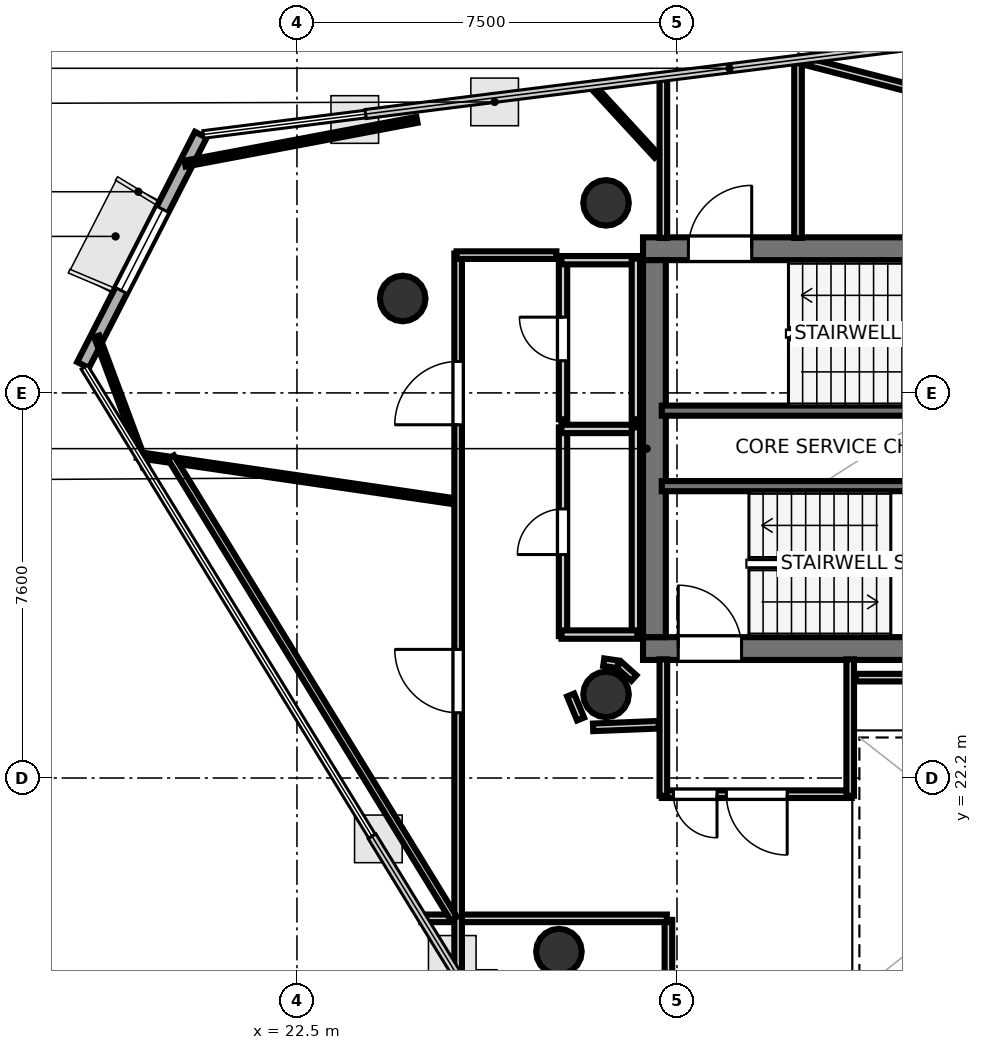
"""IFC4 building model, lengths in metres.
Left out: names, types, materials, properties, quantities, classifications, styles, units other than length and angle.
Written with IfcOpenShell. Run it as: python <this file> out.ifc"""

import sys

from ifc_helpers import new_model, si_unit, direction, frame, frame_2d, origin, origin_2d, place, context, subcontext, project, spatial, rectangle, hollow_circle, extrude, element, fill, save


model = new_model("IFC4")
c1 = context("Model", 3, precision=1e-05, world=origin(), true_north=direction((0.0, 1.0)))
c2 = subcontext(c1, "Body", "Model", "MODEL_VIEW")
j1 = project(units=[si_unit("LENGTHUNIT", "METRE"), si_unit("PLANEANGLEUNIT", "RADIAN")], contexts=[c1])
p1 = place(None, origin())
s1 = spatial("IfcSite", under=j1, at=p1, CompositionType="ELEMENT")
p2 = place(p1, origin())
s2 = spatial("IfcBuilding", under=s1, at=p2, CompositionType="ELEMENT")
p3 = place(p2, frame((0.0, 0.0, 284.3)))
s3 = spatial("IfcBuildingStorey", under=s2, at=p3, CompositionType="ELEMENT", Elevation=284.3)
p4 = place(p3, frame((29.33, 32.645, 0.0), z_axis=(0.0, 0.0, 1.0), x_axis=(1.0, 0.0, 0.0)))
e1 = element("IfcWall", 1, at=p4, inside=s3, PredefinedType="SHEAR", context=c2, shape_type="SweptSolid", body=[
    extrude(rectangle(XDim=10.52, YDim=0.45, at=frame_2d((5.26, 0.0))), origin(), (0.0, 0.0, 1.0), 3.52),
])
p5 = place(p4, frame((0.895, 0.0, 0.0)))
e2 = element("IfcOpeningElement", 2, at=p5, cuts=e1, PredefinedType="OPENING", context=c2, shape_type="SweptSolid", body=[
    extrude(rectangle(XDim=1.25, YDim=2.15, at=frame_2d((0.625, 1.075))), frame((0.0, 0.235, 0.0), z_axis=(0.0, -1.0, 0.0), x_axis=(1.0, 0.0, 0.0)), (0.0, 0.0, 1.0), 0.47),
])
p6 = place(p3, frame((29.33, 24.755, 0.0), z_axis=(0.0, 0.0, 1.0), x_axis=(1.0, 0.0, 0.0)))
e3 = element("IfcWall", 3, at=p6, inside=s3, PredefinedType="SHEAR", context=c2, shape_type="SweptSolid", body=[
    extrude(rectangle(XDim=10.52, YDim=0.45, at=frame_2d((5.26, 0.0))), origin(), (0.0, 0.0, 1.0), 3.52),
])
p7 = place(p6, frame((0.695, 0.0, 0.0)))
e4 = element("IfcOpeningElement", 4, at=p7, cuts=e3, PredefinedType="OPENING", context=c2, shape_type="SweptSolid", body=[
    extrude(rectangle(XDim=1.25, YDim=2.15, at=frame_2d((0.625, 1.075))), frame((0.0, 0.235, 0.0), z_axis=(0.0, -1.0, 0.0), x_axis=(1.0, 0.0, 0.0)), (0.0, 0.0, 1.0), 0.47),
])
p8 = place(p3, frame((29.555, 24.98, 0.0), z_axis=(0.0, 0.0, 1.0), x_axis=(0.0, 1.0, 0.0)))
e5 = element("IfcWall", 5, at=p8, inside=s3, PredefinedType="SHEAR", context=c2, shape_type="SweptSolid", body=[
    extrude(rectangle(XDim=7.44, YDim=0.45, at=frame_2d((3.72, 0.0))), origin(), (0.0, 0.0, 1.0), 3.52),
])
for number, where, z_axis, x_axis in (
    (6, (28.6, 33.55, 0.0), (0.0, 0.0, 1.0), (1.0, 0.0, 0.0)),
    (7, (28.6, 23.85, 0.0), (0.0, 0.0, 1.0), (1.0, 0.0, 0.0)),
    (8, (24.587, 31.663, 0.0), (0.0, 0.0, 1.0), (1.0, 0.0, 0.0)),
    (9, (27.67, 18.774, 0.0), (0.0, 0.0, 1.0), (1.0, 0.0, 0.0)),
):
    element("IfcColumn", number, at=place(p3, frame(where, z_axis=z_axis, x_axis=x_axis)), inside=s3, PredefinedType="COLUMN", context=c2, shape_type="SweptSolid", body=[
        extrude(hollow_circle(Radius=0.45, WallThickness=0.025, at=origin_2d()), origin(), (0.0, 0.0, 1.0), 3.7),
    ])
p9 = place(p3, frame((20.603, 34.894, 0.0), z_axis=(0.0, 0.0, 1.0), x_axis=(-0.455422024199, -0.890275676335, 0.0)))
e10 = element("IfcWall", 10, at=p9, inside=s3, PredefinedType="SOLIDWALL", context=c2, shape_type="SweptSolid", body=[
    extrude(rectangle(XDim=5.104, YDim=0.26, at=frame_2d((2.552, 0.0))), origin(), (0.0, 0.0, 1.0), 3.52),
])
p10 = place(p9, frame((1.652, 0.0, 0.85)))
e11 = element("IfcOpeningElement", 11, at=p10, cuts=e10, PredefinedType="OPENING", context=c2, shape_type="SweptSolid", body=[
    extrude(rectangle(XDim=1.8, YDim=2.1, at=frame_2d((0.9, 1.05))), frame((0.0, 0.14, 0.0), z_axis=(0.0, -1.0, 0.0), x_axis=(1.0, 0.0, 0.0)), (0.0, 0.0, 1.0), 0.28),
])
p11 = place(p3, frame((29.7, 29.45, 0.0), z_axis=(0.0, 0.0, 1.0), x_axis=(1.0, 0.0, 0.0)))
e12 = element("IfcWall", 12, at=p11, inside=s3, PredefinedType="SOLIDWALL", context=c2, shape_type="SweptSolid", body=[
    extrude(rectangle(XDim=8.3, YDim=0.2, at=frame_2d((4.15, 0.0))), origin(), (0.0, 0.0, 1.0), 3.52),
])
p12 = place(p3, frame((29.7, 27.96, 0.0), z_axis=(0.0, 0.0, 1.0), x_axis=(1.0, 0.0, 0.0)))
e13 = element("IfcWall", 13, at=p12, inside=s3, PredefinedType="SOLIDWALL", context=c2, shape_type="SweptSolid", body=[
    extrude(rectangle(XDim=7.75, YDim=0.2, at=frame_2d((3.875, 0.0))), origin(), (0.0, 0.0, 1.0), 3.52),
])
p13 = place(p3, frame((29.731, 32.858, 0.0), z_axis=(0.0, 0.0, 1.0), x_axis=(0.0, 1.0, 0.0)))
e14 = element("IfcWall", 14, at=p13, inside=s3, PredefinedType="PARTITIONING", context=c2, shape_type="SweptSolid", body=[
    extrude(rectangle(XDim=3.204, YDim=0.15, at=frame_2d((1.602, 0.0))), origin(), (0.0, 0.0, 1.0), 2.84),
])
p14 = place(p3, frame((32.389, 36.396, 0.0), z_axis=(0.0, 0.0, 1.0), x_axis=(0.0, -1.0, 0.0)))
e15 = element("IfcWall", 15, at=p14, inside=s3, PredefinedType="PARTITIONING", context=c2, shape_type="SweptSolid", body=[
    extrude(rectangle(XDim=3.538, YDim=0.15, at=frame_2d((1.769, 0.0))), origin(), (0.0, 0.0, 1.0), 2.84),
])
p15 = place(p3, frame((33.45, 21.881, 0.0), z_axis=(0.0, 0.0, 1.0), x_axis=(-1.0, 0.0, 0.0)))
e16 = element("IfcWall", 16, at=p15, inside=s3, PredefinedType="PARTITIONING", context=c2, shape_type="SweptSolid", body=[
    extrude(rectangle(XDim=3.75, YDim=0.15, at=frame_2d((1.875, 0.0))), origin(), (0.0, 0.0, 1.0), 2.84),
])
p16 = place(p15, frame((1.275, 0.0, 0.0)))
e17 = element("IfcOpeningElement", 17, at=p16, cuts=e16, PredefinedType="OPENING", context=c2, shape_type="SweptSolid", body=[
    extrude(rectangle(XDim=1.2, YDim=2.15, at=frame_2d((0.6, 1.075))), frame((0.0, 0.085, 0.0), z_axis=(0.0, -1.0, 0.0), x_axis=(1.0, 0.0, 0.0)), (0.0, 0.0, 1.0), 0.17),
])
p17 = place(p15, frame((2.66, 0.0, 0.0)))
e18 = element("IfcOpeningElement", 18, at=p17, cuts=e16, PredefinedType="OPENING", context=c2, shape_type="SweptSolid", body=[
    extrude(rectangle(XDim=0.86, YDim=2.05, at=frame_2d((0.43, 1.025))), frame((0.0, 0.085, 0.0), z_axis=(0.0, -1.0, 0.0), x_axis=(1.0, 0.0, 0.0)), (0.0, 0.0, 1.0), 0.17),
])
for number, where, z_axis, x_axis in (
    (19, (29.731, 21.85, 0.0), (0.0, 0.0, 1.0), (0.0, 1.0, 0.0)),
    (20, (33.419, 24.542, 0.0), (0.0, 0.0, 1.0), (0.0, -1.0, 0.0)),
):
    element("IfcWall", number, at=place(p3, frame(where, z_axis=z_axis, x_axis=x_axis)), inside=s3, PredefinedType="PARTITIONING", context=c2, shape_type="SweptSolid", body=[
        extrude(rectangle(XDim=2.692, YDim=0.15, at=frame_2d((1.346, 0.0))), origin(), (0.0, 0.0, 1.0), 2.84),
    ])
p18 = place(p3, frame((27.751, 25.0, 0.0), z_axis=(0.0, 0.0, 1.0), x_axis=(0.0, 1.0, 0.0)))
e21 = element("IfcWall", 21, at=p18, inside=s3, PredefinedType="PLUMBINGWALL", context=c2, shape_type="SweptSolid", body=[
    extrude(rectangle(XDim=4.12, YDim=0.165, at=frame_2d((2.06, 0.0))), origin(), (0.0, 0.0, 1.0), 2.84),
])
p19 = place(p18, frame((1.61, 0.0, 0.0)))
e22 = element("IfcOpeningElement", 22, at=p19, cuts=e21, PredefinedType="OPENING", context=c2, shape_type="SweptSolid", body=[
    extrude(rectangle(XDim=0.9, YDim=2.1, at=frame_2d((0.45, 1.05))), frame((0.0, 0.093, 0.0), z_axis=(0.0, -1.0, 0.0), x_axis=(1.0, 0.0, 0.0)), (0.0, 0.0, 1.0), 0.185),
])
p20 = place(p3, frame((27.72, 29.089, 0.0), z_axis=(0.0, 0.0, 1.0), x_axis=(1.0, 0.0, 0.0)))
e23 = element("IfcWall", 23, at=p20, inside=s3, PredefinedType="PLUMBINGWALL", context=c2, shape_type="SweptSolid", body=[
    extrude(rectangle(XDim=1.5, YDim=0.165, at=frame_2d((0.75, 0.0))), origin(), (0.0, 0.0, 1.0), 2.84),
])
p21 = place(p3, frame((29.189, 29.12, 0.0), z_axis=(0.0, 0.0, 1.0), x_axis=(0.0, -1.0, 0.0)))
e24 = element("IfcWall", 24, at=p21, inside=s3, PredefinedType="PLUMBINGWALL", context=c2, shape_type="SweptSolid", body=[
    extrude(rectangle(XDim=4.12, YDim=0.165, at=frame_2d((2.06, 0.0))), origin(), (0.0, 0.0, 1.0), 2.84),
])
p22 = place(p3, frame((29.22, 25.031, 0.0), z_axis=(0.0, 0.0, 1.0), x_axis=(-1.0, 0.0, 0.0)))
e25 = element("IfcWall", 25, at=p22, inside=s3, PredefinedType="PLUMBINGWALL", context=c2, shape_type="SweptSolid", body=[
    extrude(rectangle(XDim=1.5, YDim=0.165, at=frame_2d((0.75, 0.0))), origin(), (0.0, 0.0, 1.0), 2.84),
])
p23 = place(p3, frame((27.751, 29.28, 0.0), z_axis=(0.0, 0.0, 1.0), x_axis=(0.0, 1.0, 0.0)))
e26 = element("IfcWall", 26, at=p23, inside=s3, PredefinedType="PLUMBINGWALL", context=c2, shape_type="SweptSolid", body=[
    extrude(rectangle(XDim=3.17, YDim=0.165, at=frame_2d((1.585, 0.0))), origin(), (0.0, 0.0, 1.0), 2.84),
])
p24 = place(p23, frame((1.155, 0.0, 0.0)))
e27 = element("IfcOpeningElement", 27, at=p24, cuts=e26, PredefinedType="OPENING", context=c2, shape_type="SweptSolid", body=[
    extrude(rectangle(XDim=0.86, YDim=2.05, at=frame_2d((0.43, 1.025))), frame((0.0, 0.093, 0.0), z_axis=(0.0, -1.0, 0.0), x_axis=(1.0, 0.0, 0.0)), (0.0, 0.0, 1.0), 0.185),
])
p25 = place(p3, frame((27.72, 32.419, 0.0), z_axis=(0.0, 0.0, 1.0), x_axis=(1.0, 0.0, 0.0)))
e28 = element("IfcWall", 28, at=p25, inside=s3, PredefinedType="PLUMBINGWALL", context=c2, shape_type="SweptSolid", body=[
    extrude(rectangle(XDim=1.5, YDim=0.165, at=frame_2d((0.75, 0.0))), origin(), (0.0, 0.0, 1.0), 2.84),
])
p26 = place(p3, frame((29.189, 32.45, 0.0), z_axis=(0.0, 0.0, 1.0), x_axis=(0.0, -1.0, 0.0)))
e29 = element("IfcWall", 29, at=p26, inside=s3, PredefinedType="PLUMBINGWALL", context=c2, shape_type="SweptSolid", body=[
    extrude(rectangle(XDim=3.17, YDim=0.165, at=frame_2d((1.585, 0.0))), origin(), (0.0, 0.0, 1.0), 2.84),
])
p27 = place(p3, frame((37.872, 24.181, 0.0), z_axis=(0.0, 0.0, 1.0), x_axis=(-1.0, 0.0, 0.0)))
e30 = element("IfcWall", 30, at=p27, inside=s3, PredefinedType="PARTITIONING", context=c2, shape_type="SweptSolid", body=[
    extrude(rectangle(XDim=4.342, YDim=0.15, at=frame_2d((2.171, 0.0))), origin(), (0.0, 0.0, 1.0), 2.84),
])
p28 = place(p3, frame((29.149, 24.173, 0.0), z_axis=(0.0, 0.0, 1.0), x_axis=(-0.745225165416, 0.666812906917, 0.0)))
e31 = element("IfcWall", 31, at=p28, inside=s3, PredefinedType="PARTITIONING", context=c2, shape_type="SweptSolid", body=[
    extrude(rectangle(XDim=0.396, YDim=0.15, at=frame_2d((0.198, 0.0))), origin(), (0.0, 0.0, 1.0), 2.84),
])
p29 = place(p3, frame((28.838, 24.444, 0.0), z_axis=(0.0, 0.0, 1.0), x_axis=(-0.989449148305, 0.144880581578, 0.0)))
e32 = element("IfcWall", 32, at=p29, inside=s3, PredefinedType="PARTITIONING", context=c2, shape_type="SweptSolid", body=[
    extrude(rectangle(XDim=0.286, YDim=0.15, at=frame_2d((0.143, 0.0))), origin(), (0.0, 0.0, 1.0), 2.84),
])
p30 = place(p3, frame((32.406, 36.378, 0.0), z_axis=(0.0, 0.0, 1.0), x_axis=(0.968212286396, -0.250129903194, 0.0)))
e33 = element("IfcWall", 33, at=p30, inside=s3, PredefinedType="PARTITIONING", context=c2, shape_type="SweptSolid", body=[
    extrude(rectangle(XDim=3.635, YDim=0.15, at=frame_2d((1.817, 0.0))), origin(), (0.0, 0.0, 1.0), 2.84),
])
p31 = place(p3, frame((27.901, 23.838, 0.0), z_axis=(0.0, 0.0, 1.0), x_axis=(0.382856448334, -0.923807847969, 0.0)))
e34 = element("IfcWall", 34, at=p31, inside=s3, PredefinedType="PARTITIONING", context=c2, shape_type="SweptSolid", body=[
    extrude(rectangle(XDim=0.513, YDim=0.15, at=frame_2d((0.256, 0.0))), origin(), (0.0, 0.0, 1.0), 2.84),
])
p32 = place(p3, frame((28.345, 23.2, 0.0), z_axis=(0.0, 0.0, 1.0), x_axis=(0.999216536924, 0.039576664043, 0.0)))
e35 = element("IfcWall", 35, at=p32, inside=s3, PredefinedType="PARTITIONING", context=c2, shape_type="SweptSolid", body=[
    extrude(rectangle(XDim=1.295, YDim=0.15, at=frame_2d((0.648, 0.0))), origin(), (0.0, 0.0, 1.0), 2.84),
])
p33 = place(p3, frame((29.831, 16.05, 0.0), z_axis=(0.0, 0.0, 1.0), x_axis=(0.0, 1.0, 0.0)))
e36 = element("IfcWall", 36, at=p33, inside=s3, PredefinedType="PARTITIONING", context=c2, shape_type="SweptSolid", body=[
    extrude(rectangle(XDim=3.35, YDim=0.15, at=frame_2d((1.675, 0.0))), origin(), (0.0, 0.0, 1.0), 2.84),
])
p34 = place(p3, frame((29.8, 19.431, 0.0), z_axis=(0.0, 0.0, 1.0), x_axis=(-1.0, 0.0, 0.0)))
e37 = element("IfcWall", 37, at=p34, inside=s3, PredefinedType="PARTITIONING", context=c2, shape_type="SweptSolid", body=[
    extrude(rectangle(XDim=4.845, YDim=0.15, at=frame_2d((2.423, 0.0))), origin(), (0.0, 0.0, 1.0), 2.84),
])
p35 = place(p3, frame((25.681, 18.26, 0.0), z_axis=(0.0, 0.0, 1.0), x_axis=(0.0, 1.0, 0.0)))
e38 = element("IfcWall", 38, at=p35, inside=s3, PredefinedType="PARTITIONING", context=c2, shape_type="SweptSolid", body=[
    extrude(rectangle(XDim=14.291, YDim=0.15, at=frame_2d((7.145, 0.0))), origin(), (0.0, 0.0, 1.0), 2.84),
])
p36 = place(p35, frame((5.229, 0.0, 0.0)))
e39 = element("IfcOpeningElement", 39, at=p36, cuts=e38, PredefinedType="OPENING", context=c2, shape_type="SweptSolid", body=[
    extrude(rectangle(XDim=1.25, YDim=2.2, at=frame_2d((0.625, 1.1))), frame((0.0, 0.085, 0.0), z_axis=(0.0, -1.0, 0.0), x_axis=(1.0, 0.0, 0.0)), (0.0, 0.0, 1.0), 0.17),
])
p37 = place(p35, frame((10.912, 0.0, 0.0)))
e40 = element("IfcOpeningElement", 40, at=p37, cuts=e38, PredefinedType="OPENING", context=c2, shape_type="SweptSolid", body=[
    extrude(rectangle(XDim=1.25, YDim=2.2, at=frame_2d((0.625, 1.1))), frame((0.0, 0.085, 0.0), z_axis=(0.0, -1.0, 0.0), x_axis=(1.0, 0.0, 0.0)), (0.0, 0.0, 1.0), 0.17),
])
p38 = place(p3, frame((25.65, 32.519, 0.0), z_axis=(0.0, 0.0, 1.0), x_axis=(1.0, 0.0, 0.0)))
e41 = element("IfcWall", 41, at=p38, inside=s3, PredefinedType="PARTITIONING", context=c2, shape_type="SweptSolid", body=[
    extrude(rectangle(XDim=1.97, YDim=0.15, at=frame_2d((0.985, 0.0))), origin(), (0.0, 0.0, 1.0), 2.84),
])
p39 = place(p3, frame((19.348, 28.576, 0.0), z_axis=(0.0, 0.0, 1.0), x_axis=(0.989508807114, -0.144472560175, 0.0)))
e42 = element("IfcWall", 42, at=p39, inside=s3, PredefinedType="PARTITIONING", context=c2, shape_type="SweptSolid", body=[
    extrude(rectangle(XDim=6.283, YDim=0.12, at=frame_2d((3.142, 0.0))), origin(), (0.0, 0.0, 1.0), 2.84),
])
p40 = place(p3, frame((25.596, 19.423, 0.0), z_axis=(0.0, 0.0, 1.0), x_axis=(-0.522792463497, 0.852459993261, 0.0)))
e43 = element("IfcWall", 43, at=p40, inside=s3, PredefinedType="PARTITIONING", context=c2, shape_type="SweptSolid", body=[
    extrude(rectangle(XDim=10.683, YDim=0.14, at=frame_2d((5.342, 0.0))), origin(), (0.0, 0.0, 1.0), 2.84),
])
p41 = place(p3, frame((28.307, 35.879, 0.0), z_axis=(0.0, 0.0, 1.0), x_axis=(0.677289660451, -0.735716464303, 0.0)))
e44 = element("IfcWall", 44, at=p41, inside=s3, PredefinedType="PARTITIONING", context=c2, shape_type="SweptSolid", body=[
    extrude(rectangle(XDim=1.906, YDim=0.105, at=frame_2d((0.953, 0.0))), origin(), (0.0, 0.0, 1.0), 2.84),
])
p42 = place(p3, frame((19.506, 28.349, 0.0), z_axis=(0.0, 0.0, 1.0), x_axis=(-0.349316148689, 0.937004924355, 0.0)))
e45 = element("IfcWall", 45, at=p42, inside=s3, PredefinedType="PARTITIONING", context=c2, shape_type="SweptSolid", body=[
    extrude(rectangle(XDim=2.74, YDim=0.105, at=frame_2d((1.37, 0.0))), origin(), (0.0, 0.0, 1.0), 2.84),
])
p43 = place(p3, frame((20.293, 34.325, 0.0), z_axis=(0.0, 0.0, 1.0), x_axis=(0.982650656503, 0.185466135115, 0.0)))
e46 = element("IfcWall", 46, at=p43, inside=s3, PredefinedType="PARTITIONING", context=c2, shape_type="SweptSolid", body=[
    extrude(rectangle(XDim=4.656, YDim=0.12, at=frame_2d((2.328, 0.0))), origin(), (0.0, 0.0, 1.0), 2.84),
])
p44 = place(p5, origin())
e47 = element("IfcDoor", 47, at=p44, inside=s3, OperationType="SINGLE_SWING_RIGHT", PredefinedType="DOOR", context=c2, shape_type="SweptSolid", body=[
    extrude(rectangle(XDim=1.25, YDim=2.15, at=frame_2d((0.625, 1.075))), frame((0.0, 0.025, 0.0), z_axis=(0.0, -1.0, 0.0), x_axis=(1.0, 0.0, 0.0)), (0.0, 0.0, 1.0), 0.05),
])
fill(e2, e47)
p45 = place(p7, origin())
e48 = element("IfcDoor", 48, at=p45, inside=s3, OperationType="SINGLE_SWING_LEFT", PredefinedType="DOOR", context=c2, shape_type="SweptSolid", body=[
    extrude(rectangle(XDim=1.25, YDim=2.15, at=frame_2d((0.625, 1.075))), frame((0.0, 0.025, 0.0), z_axis=(0.0, -1.0, 0.0), x_axis=(1.0, 0.0, 0.0)), (0.0, 0.0, 1.0), 0.05),
])
fill(e4, e48)
p46 = place(p16, origin())
e49 = element("IfcDoor", 49, at=p46, inside=s3, OperationType="SINGLE_SWING_LEFT", PredefinedType="DOOR", context=c2, shape_type="SweptSolid", body=[
    extrude(rectangle(XDim=1.2, YDim=2.15, at=frame_2d((0.6, 1.075))), frame((0.0, 0.025, 0.0), z_axis=(0.0, -1.0, 0.0), x_axis=(1.0, 0.0, 0.0)), (0.0, 0.0, 1.0), 0.05),
])
fill(e17, e49)
p47 = place(p19, origin())
e50 = element("IfcDoor", 50, at=p47, inside=s3, OperationType="SINGLE_SWING_LEFT", PredefinedType="DOOR", context=c2, shape_type="SweptSolid", body=[
    extrude(rectangle(XDim=0.9, YDim=2.1, at=frame_2d((0.45, 1.05))), frame((0.0, 0.025, 0.0), z_axis=(0.0, -1.0, 0.0), x_axis=(1.0, 0.0, 0.0)), (0.0, 0.0, 1.0), 0.05),
])
fill(e22, e50)
p48 = place(p24, origin())
e51 = element("IfcDoor", 51, at=p48, inside=s3, OperationType="SINGLE_SWING_RIGHT", PredefinedType="DOOR", context=c2, shape_type="SweptSolid", body=[
    extrude(rectangle(XDim=0.86, YDim=2.05, at=frame_2d((0.43, 1.025))), frame((0.0, 0.025, 0.0), z_axis=(0.0, -1.0, 0.0), x_axis=(1.0, 0.0, 0.0)), (0.0, 0.0, 1.0), 0.05),
])
fill(e27, e51)
p49 = place(p17, origin())
e52 = element("IfcDoor", 52, at=p49, inside=s3, OperationType="SINGLE_SWING_LEFT", PredefinedType="DOOR", context=c2, shape_type="SweptSolid", body=[
    extrude(rectangle(XDim=0.86, YDim=2.05, at=frame_2d((0.43, 1.025))), frame((0.0, 0.025, 0.0), z_axis=(0.0, -1.0, 0.0), x_axis=(1.0, 0.0, 0.0)), (0.0, 0.0, 1.0), 0.05),
])
fill(e18, e52)
p50 = place(p36, origin())
e53 = element("IfcDoor", 53, at=p50, inside=s3, OperationType="SINGLE_SWING_RIGHT", PredefinedType="DOOR", context=c2, shape_type="SweptSolid", body=[
    extrude(rectangle(XDim=1.25, YDim=2.2, at=frame_2d((0.625, 1.1))), frame((0.0, 0.025, 0.0), z_axis=(0.0, -1.0, 0.0), x_axis=(1.0, 0.0, 0.0)), (0.0, 0.0, 1.0), 0.05),
])
fill(e39, e53)
p51 = place(p37, origin())
e54 = element("IfcDoor", 54, at=p51, inside=s3, OperationType="SINGLE_SWING_LEFT", PredefinedType="DOOR", context=c2, shape_type="SweptSolid", body=[
    extrude(rectangle(XDim=1.25, YDim=2.2, at=frame_2d((0.625, 1.1))), frame((0.0, 0.025, 0.0), z_axis=(0.0, -1.0, 0.0), x_axis=(1.0, 0.0, 0.0)), (0.0, 0.0, 1.0), 0.05),
])
fill(e40, e54)
p52 = place(p10, origin())
e55 = element("IfcWindow", 55, at=p52, inside=s3, PartitioningType="SINGLE_PANEL", PredefinedType="WINDOW", context=c2, shape_type="SweptSolid", body=[
    extrude(rectangle(XDim=1.8, YDim=2.1, at=frame_2d((0.9, 1.05))), frame((0.0, 0.03, 0.0), z_axis=(0.0, -1.0, 0.0), x_axis=(1.0, 0.0, 0.0)), (0.0, 0.0, 1.0), 0.06),
])
fill(e11, e55)
save(model, sys.argv[1])
